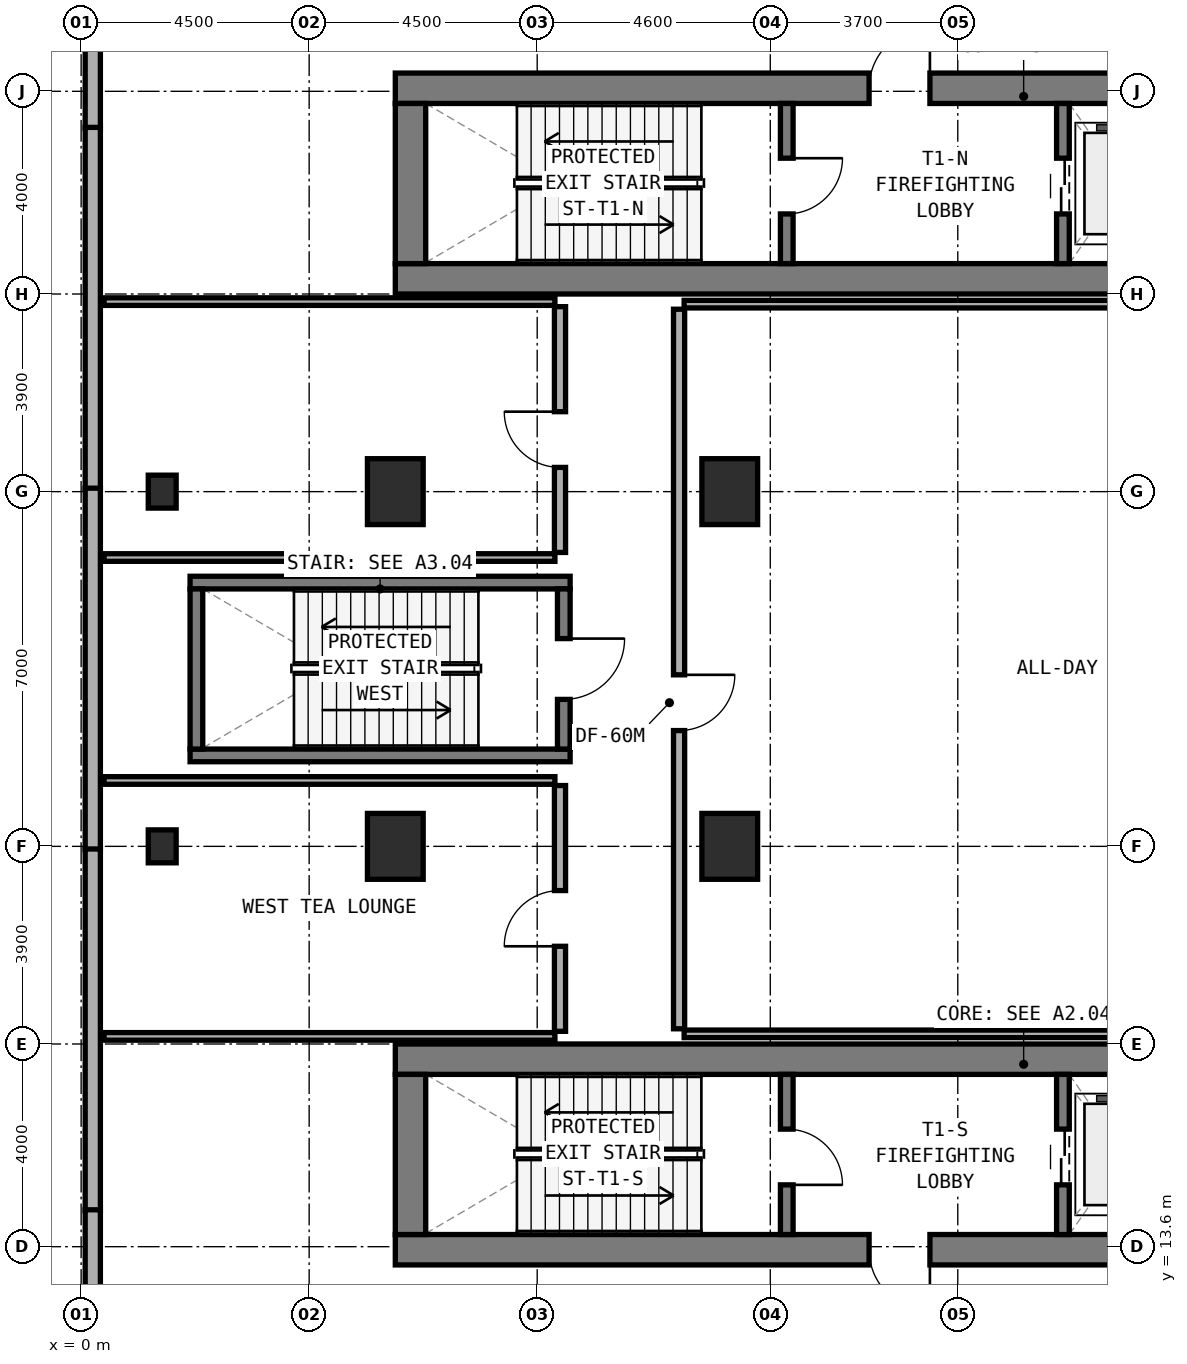
"""IFC4 building model, lengths in metres.
Left out: names, types, materials, properties, quantities, classifications, styles, units other than length and angle.
Written with IfcOpenShell. Run it as: python <this file> out.ifc"""

import sys

from ifc_helpers import new_model, si_unit, direction, frame, frame_2d, origin, origin_2d, place, context, subcontext, project, spatial, rectangle, extrude, element, fill, save


model = new_model("IFC4")
c1 = context("Model", 3, precision=1e-05, world=origin(), true_north=direction((0.0, 1.0)))
c2 = subcontext(c1, "Body", "Model", "MODEL_VIEW")
j1 = project(units=[si_unit("LENGTHUNIT", "METRE"), si_unit("PLANEANGLEUNIT", "RADIAN")], contexts=[c1])
p1 = place(None, origin())
s1 = spatial("IfcSite", under=j1, at=p1, CompositionType="ELEMENT")
p2 = place(p1, origin())
s2 = spatial("IfcBuilding", under=s1, at=p2, CompositionType="ELEMENT")
p3 = place(p2, frame((0.0, 0.0, 5.4)))
s3 = spatial("IfcBuildingStorey", under=s2, at=p3, CompositionType="ELEMENT", Elevation=5.4)
p4 = place(p3, frame((6.2, 32.7, 0.0), z_axis=(0.0, 0.0, 1.0), x_axis=(1.0, 0.0, 0.0)))
e1 = element("IfcWall", 1, at=p4, inside=s3, PredefinedType="SHEAR", context=c2, shape_type="SweptSolid", body=[
    extrude(rectangle(XDim=24.8, YDim=0.6, at=frame_2d((12.4, 0.0))), origin(), (0.0, 0.0, 1.0), 4.8),
])
p5 = place(p3, frame((6.2, 36.46, 0.0), z_axis=(0.0, 0.0, 1.0), x_axis=(1.0, 0.0, 0.0)))
e2 = element("IfcWall", 2, at=p5, inside=s3, PredefinedType="SHEAR", context=c2, shape_type="SweptSolid", body=[
    extrude(rectangle(XDim=24.8, YDim=0.6, at=frame_2d((12.4, 0.0))), origin(), (0.0, 0.0, 1.0), 4.8),
])
p6 = place(p5, frame((9.35, 0.0, 0.0)))
e3 = element("IfcOpeningElement", 3, at=p6, cuts=e2, PredefinedType="OPENING", context=c2, shape_type="SweptSolid", body=[
    extrude(rectangle(XDim=1.2, YDim=2.15, at=frame_2d((0.6, 1.075))), frame((0.0, 0.31, 0.0), z_axis=(0.0, -1.0, 0.0), x_axis=(1.0, 0.0, 0.0)), (0.0, 0.0, 1.0), 0.62),
])
p7 = place(p5, frame((17.14, 0.0, 0.0)))
e4 = element("IfcOpeningElement", 4, at=p7, cuts=e2, PredefinedType="OPENING", context=c2, shape_type="SweptSolid", body=[
    extrude(rectangle(XDim=0.85, YDim=2.1, at=frame_2d((0.425, 1.05))), frame((0.0, 0.31, 0.0), z_axis=(0.0, -1.0, 0.0), x_axis=(1.0, 0.0, 0.0)), (0.0, 0.0, 1.0), 0.62),
])
p8 = place(p5, frame((18.983, 0.0, 0.0)))
e5 = element("IfcOpeningElement", 5, at=p8, cuts=e2, PredefinedType="OPENING", context=c2, shape_type="SweptSolid", body=[
    extrude(rectangle(XDim=1.1, YDim=2.15, at=frame_2d((0.55, 1.075))), frame((0.0, 0.31, 0.0), z_axis=(0.0, -1.0, 0.0), x_axis=(1.0, 0.0, 0.0)), (0.0, 0.0, 1.0), 0.62),
])
p9 = place(p5, frame((20.85, 0.0, 0.0)))
e6 = element("IfcOpeningElement", 6, at=p9, cuts=e2, PredefinedType="OPENING", context=c2, shape_type="SweptSolid", body=[
    extrude(rectangle(XDim=1.1, YDim=2.15, at=frame_2d((0.55, 1.075))), frame((0.0, 0.31, 0.0), z_axis=(0.0, -1.0, 0.0), x_axis=(1.0, 0.0, 0.0)), (0.0, 0.0, 1.0), 0.62),
])
p10 = place(p5, frame((22.716, 0.0, 0.0)))
e7 = element("IfcOpeningElement", 7, at=p10, cuts=e2, PredefinedType="OPENING", context=c2, shape_type="SweptSolid", body=[
    extrude(rectangle(XDim=1.1, YDim=2.15, at=frame_2d((0.55, 1.075))), frame((0.0, 0.31, 0.0), z_axis=(0.0, -1.0, 0.0), x_axis=(1.0, 0.0, 0.0)), (0.0, 0.0, 1.0), 0.62),
])
p11 = place(p3, frame((6.5, 33.0, 0.0), z_axis=(0.0, 0.0, 1.0), x_axis=(0.0, 1.0, 0.0)))
e8 = element("IfcWall", 8, at=p11, inside=s3, PredefinedType="SHEAR", context=c2, shape_type="SweptSolid", body=[
    extrude(rectangle(XDim=3.16, YDim=0.6, at=frame_2d((1.58, 0.0))), origin(), (0.0, 0.0, 1.0), 4.8),
])
p12 = place(p3, frame((13.925, 33.0, 0.0), z_axis=(0.0, 0.0, 1.0), x_axis=(0.0, 1.0, 0.0)))
e9 = element("IfcWall", 9, at=p12, inside=s3, PredefinedType="STANDARD", context=c2, shape_type="SweptSolid", body=[
    extrude(rectangle(XDim=3.16, YDim=0.25, at=frame_2d((1.58, 0.0))), origin(), (0.0, 0.0, 1.0), 4.45),
])
p13 = place(p12, frame((0.98, 0.0, 0.0)))
e10 = element("IfcOpeningElement", 10, at=p13, cuts=e9, PredefinedType="OPENING", context=c2, shape_type="SweptSolid", body=[
    extrude(rectangle(XDim=1.1, YDim=2.15, at=frame_2d((0.55, 1.075))), frame((0.0, 0.135, 0.0), z_axis=(0.0, -1.0, 0.0), x_axis=(1.0, 0.0, 0.0)), (0.0, 0.0, 1.0), 0.27),
])
p14 = place(p3, frame((19.375, 33.0, 0.0), z_axis=(0.0, 0.0, 1.0), x_axis=(0.0, 1.0, 0.0)))
e11 = element("IfcWall", 11, at=p14, inside=s3, PredefinedType="STANDARD", context=c2, shape_type="SweptSolid", body=[
    extrude(rectangle(XDim=3.16, YDim=0.25, at=frame_2d((1.58, 0.0))), origin(), (0.0, 0.0, 1.0), 4.45),
])
p15 = place(p14, frame((0.98, 0.0, 0.0)))
e12 = element("IfcOpeningElement", 12, at=p15, cuts=e11, PredefinedType="OPENING", context=c2, shape_type="SweptSolid", body=[
    extrude(rectangle(XDim=1.1, YDim=2.15, at=frame_2d((0.55, 1.075))), frame((0.0, 0.135, 0.0), z_axis=(0.0, -1.0, 0.0), x_axis=(1.0, 0.0, 0.0)), (0.0, 0.0, 1.0), 0.27),
])
p16 = place(p3, frame((6.2, 13.54, 0.0), z_axis=(0.0, 0.0, 1.0), x_axis=(1.0, 0.0, 0.0)))
e13 = element("IfcWall", 13, at=p16, inside=s3, PredefinedType="SHEAR", context=c2, shape_type="SweptSolid", body=[
    extrude(rectangle(XDim=24.8, YDim=0.6, at=frame_2d((12.4, 0.0))), origin(), (0.0, 0.0, 1.0), 4.8),
])
p17 = place(p16, frame((9.35, 0.0, 0.0)))
e14 = element("IfcOpeningElement", 14, at=p17, cuts=e13, PredefinedType="OPENING", context=c2, shape_type="SweptSolid", body=[
    extrude(rectangle(XDim=1.2, YDim=2.15, at=frame_2d((0.6, 1.075))), frame((0.0, 0.31, 0.0), z_axis=(0.0, -1.0, 0.0), x_axis=(1.0, 0.0, 0.0)), (0.0, 0.0, 1.0), 0.62),
])
p18 = place(p16, frame((17.14, 0.0, 0.0)))
e15 = element("IfcOpeningElement", 15, at=p18, cuts=e13, PredefinedType="OPENING", context=c2, shape_type="SweptSolid", body=[
    extrude(rectangle(XDim=0.85, YDim=2.1, at=frame_2d((0.425, 1.05))), frame((0.0, 0.31, 0.0), z_axis=(0.0, -1.0, 0.0), x_axis=(1.0, 0.0, 0.0)), (0.0, 0.0, 1.0), 0.62),
])
p19 = place(p16, frame((18.983, 0.0, 0.0)))
e16 = element("IfcOpeningElement", 16, at=p19, cuts=e13, PredefinedType="OPENING", context=c2, shape_type="SweptSolid", body=[
    extrude(rectangle(XDim=1.1, YDim=2.15, at=frame_2d((0.55, 1.075))), frame((0.0, 0.31, 0.0), z_axis=(0.0, -1.0, 0.0), x_axis=(1.0, 0.0, 0.0)), (0.0, 0.0, 1.0), 0.62),
])
p20 = place(p16, frame((20.85, 0.0, 0.0)))
e17 = element("IfcOpeningElement", 17, at=p20, cuts=e13, PredefinedType="OPENING", context=c2, shape_type="SweptSolid", body=[
    extrude(rectangle(XDim=1.1, YDim=2.15, at=frame_2d((0.55, 1.075))), frame((0.0, 0.31, 0.0), z_axis=(0.0, -1.0, 0.0), x_axis=(1.0, 0.0, 0.0)), (0.0, 0.0, 1.0), 0.62),
])
p21 = place(p16, frame((22.716, 0.0, 0.0)))
e18 = element("IfcOpeningElement", 18, at=p21, cuts=e13, PredefinedType="OPENING", context=c2, shape_type="SweptSolid", body=[
    extrude(rectangle(XDim=1.1, YDim=2.15, at=frame_2d((0.55, 1.075))), frame((0.0, 0.31, 0.0), z_axis=(0.0, -1.0, 0.0), x_axis=(1.0, 0.0, 0.0)), (0.0, 0.0, 1.0), 0.62),
])
p22 = place(p3, frame((6.2, 17.3, 0.0), z_axis=(0.0, 0.0, 1.0), x_axis=(1.0, 0.0, 0.0)))
e19 = element("IfcWall", 19, at=p22, inside=s3, PredefinedType="SHEAR", context=c2, shape_type="SweptSolid", body=[
    extrude(rectangle(XDim=24.8, YDim=0.6, at=frame_2d((12.4, 0.0))), origin(), (0.0, 0.0, 1.0), 4.8),
])
p23 = place(p3, frame((6.5, 13.84, 0.0), z_axis=(0.0, 0.0, 1.0), x_axis=(0.0, 1.0, 0.0)))
e20 = element("IfcWall", 20, at=p23, inside=s3, PredefinedType="SHEAR", context=c2, shape_type="SweptSolid", body=[
    extrude(rectangle(XDim=3.16, YDim=0.6, at=frame_2d((1.58, 0.0))), origin(), (0.0, 0.0, 1.0), 4.8),
])
p24 = place(p3, frame((13.925, 13.84, 0.0), z_axis=(0.0, 0.0, 1.0), x_axis=(0.0, 1.0, 0.0)))
e21 = element("IfcWall", 21, at=p24, inside=s3, PredefinedType="STANDARD", context=c2, shape_type="SweptSolid", body=[
    extrude(rectangle(XDim=3.16, YDim=0.25, at=frame_2d((1.58, 0.0))), origin(), (0.0, 0.0, 1.0), 4.45),
])
p25 = place(p24, frame((0.98, 0.0, 0.0)))
e22 = element("IfcOpeningElement", 22, at=p25, cuts=e21, PredefinedType="OPENING", context=c2, shape_type="SweptSolid", body=[
    extrude(rectangle(XDim=1.1, YDim=2.15, at=frame_2d((0.55, 1.075))), frame((0.0, 0.135, 0.0), z_axis=(0.0, -1.0, 0.0), x_axis=(1.0, 0.0, 0.0)), (0.0, 0.0, 1.0), 0.27),
])
p26 = place(p3, frame((19.375, 13.84, 0.0), z_axis=(0.0, 0.0, 1.0), x_axis=(0.0, 1.0, 0.0)))
e23 = element("IfcWall", 23, at=p26, inside=s3, PredefinedType="STANDARD", context=c2, shape_type="SweptSolid", body=[
    extrude(rectangle(XDim=3.16, YDim=0.25, at=frame_2d((1.58, 0.0))), origin(), (0.0, 0.0, 1.0), 4.45),
])
p27 = place(p26, frame((0.98, 0.0, 0.0)))
e24 = element("IfcOpeningElement", 24, at=p27, cuts=e23, PredefinedType="OPENING", context=c2, shape_type="SweptSolid", body=[
    extrude(rectangle(XDim=1.1, YDim=2.15, at=frame_2d((0.55, 1.075))), frame((0.0, 0.135, 0.0), z_axis=(0.0, -1.0, 0.0), x_axis=(1.0, 0.0, 0.0)), (0.0, 0.0, 1.0), 0.27),
])
for number, where, z_axis, x_axis in (
    (25, (2.15, 23.295, 0.0), (0.0, 0.0, 1.0), (1.0, 0.0, 0.0)),
    (26, (2.15, 26.705, 0.0), (0.0, 0.0, 1.0), (1.0, 0.0, 0.0)),
):
    element("IfcWall", number, at=place(p3, frame(where, z_axis=z_axis, x_axis=x_axis)), inside=s3, PredefinedType="STANDARD", context=c2, shape_type="SweptSolid", body=[
        extrude(rectangle(XDim=7.5, YDim=0.25, at=frame_2d((3.75, 0.0))), origin(), (0.0, 0.0, 1.0), 4.8),
    ])
p28 = place(p3, frame((2.275, 23.42, 0.0), z_axis=(0.0, 0.0, 1.0), x_axis=(0.0, 1.0, 0.0)))
e27 = element("IfcWall", 27, at=p28, inside=s3, PredefinedType="STANDARD", context=c2, shape_type="SweptSolid", body=[
    extrude(rectangle(XDim=3.16, YDim=0.25, at=frame_2d((1.58, 0.0))), origin(), (0.0, 0.0, 1.0), 4.8),
])
p29 = place(p3, frame((9.525, 23.42, 0.0), z_axis=(0.0, 0.0, 1.0), x_axis=(0.0, 1.0, 0.0)))
e28 = element("IfcWall", 28, at=p29, inside=s3, PredefinedType="STANDARD", context=c2, shape_type="SweptSolid", body=[
    extrude(rectangle(XDim=3.16, YDim=0.25, at=frame_2d((1.58, 0.0))), origin(), (0.0, 0.0, 1.0), 4.8),
])
p30 = place(p29, frame((0.98, 0.0, 0.0)))
e29 = element("IfcOpeningElement", 29, at=p30, cuts=e28, PredefinedType="OPENING", context=c2, shape_type="SweptSolid", body=[
    extrude(rectangle(XDim=1.2, YDim=2.15, at=frame_2d((0.6, 1.075))), frame((0.0, 0.135, 0.0), z_axis=(0.0, -1.0, 0.0), x_axis=(1.0, 0.0, 0.0)), (0.0, 0.0, 1.0), 0.27),
])
for number, where, z_axis, x_axis in (
    (30, (6.2, 21.5, 0.0), (0.0, 0.0, 1.0), (1.0, 0.0, 0.0)),
    (31, (6.2, 28.5, 0.0), (0.0, 0.0, 1.0), (1.0, 0.0, 0.0)),
    (32, (12.8, 21.5, 0.0), (0.0, 0.0, 1.0), (1.0, 0.0, 0.0)),
    (33, (12.8, 28.5, 0.0), (0.0, 0.0, 1.0), (1.0, 0.0, 0.0)),
):
    element("IfcColumn", number, at=place(p3, frame(where, z_axis=z_axis, x_axis=x_axis)), inside=s3, PredefinedType="COLUMN", context=c2, shape_type="SweptSolid", body=[
        extrude(rectangle(XDim=1.1, YDim=1.3, at=origin_2d()), origin(), (0.0, 0.0, 1.0), 4.8),
    ])
for number, where, z_axis, x_axis in (
    (34, (1.6, 21.5, 0.0), (0.0, 0.0, 1.0), (1.0, 0.0, 0.0)),
    (35, (1.6, 28.5, 0.0), (0.0, 0.0, 1.0), (1.0, 0.0, 0.0)),
):
    element("IfcColumn", number, at=place(p3, frame(where, z_axis=z_axis, x_axis=x_axis)), inside=s3, PredefinedType="PILASTER", context=c2, shape_type="SweptSolid", body=[
        extrude(rectangle(XDim=0.55, YDim=0.65, at=origin_2d()), origin(), (0.0, 0.0, 1.0), 4.8),
    ])
for number, where, z_axis, x_axis in (
    (36, (0.23, 42.808, 0.0), (0.0, 0.0, 1.0), (0.0, -1.0, 0.0)),
    (37, (0.23, 35.688, 0.0), (0.0, 0.0, 1.0), (0.0, -1.0, 0.0)),
):
    element("IfcWall", number, at=place(p3, frame(where, z_axis=z_axis, x_axis=x_axis)), inside=s3, PredefinedType="STANDARD", context=c2, shape_type="SweptSolid", body=[
        extrude(rectangle(XDim=7.136, YDim=0.3, at=frame_2d((3.568, 0.0))), origin(), (0.0, 0.0, 1.0), 4.45),
    ])
p31 = place(p3, frame((0.23, 28.568, 0.0), z_axis=(0.0, 0.0, 1.0), x_axis=(0.0, -1.0, 0.0)))
e38 = element("IfcWall", 38, at=p31, inside=s3, PredefinedType="STANDARD", context=c2, shape_type="SweptSolid", body=[
    extrude(rectangle(XDim=7.136, YDim=0.3, at=frame_2d((3.568, 0.0))), origin(), (0.0, 0.0, 1.0), 4.45),
])
for number, where, z_axis, x_axis in (
    (39, (0.23, 21.448, 0.0), (0.0, 0.0, 1.0), (0.0, -1.0, 0.0)),
    (40, (0.23, 14.328, 0.0), (0.0, 0.0, 1.0), (0.0, -1.0, 0.0)),
):
    element("IfcWall", number, at=place(p3, frame(where, z_axis=z_axis, x_axis=x_axis)), inside=s3, PredefinedType="STANDARD", context=c2, shape_type="SweptSolid", body=[
        extrude(rectangle(XDim=7.136, YDim=0.3, at=frame_2d((3.568, 0.0))), origin(), (0.0, 0.0, 1.0), 4.45),
    ])
for number, where, z_axis, x_axis in (
    (41, (11.9, 17.8, 0.0), (0.0, 0.0, 1.0), (1.0, 0.0, 0.0)),
    (42, (11.9, 32.2, 0.0), (0.0, 0.0, 1.0), (1.0, 0.0, 0.0)),
):
    element("IfcWall", number, at=place(p3, frame(where, z_axis=z_axis, x_axis=x_axis)), inside=s3, PredefinedType="PARTITIONING", context=c2, shape_type="SweptSolid", body=[
        extrude(rectangle(XDim=18.85, YDim=0.15, at=frame_2d((9.425, 0.0))), origin(), (0.0, 0.0, 1.0), 3.525),
    ])
p32 = place(p3, frame((11.8, 17.9, 0.0), z_axis=(0.0, 0.0, 1.0), x_axis=(0.0, 1.0, 0.0)))
e43 = element("IfcWall", 43, at=p32, inside=s3, PredefinedType="SOLIDWALL", context=c2, shape_type="SweptSolid", body=[
    extrude(rectangle(XDim=14.2, YDim=0.22, at=frame_2d((7.1, 0.0))), origin(), (0.0, 0.0, 1.0), 3.525),
])
p33 = place(p32, frame((5.885, 0.0, 0.0)))
e44 = element("IfcOpeningElement", 44, at=p33, cuts=e43, PredefinedType="OPENING", context=c2, shape_type="SweptSolid", body=[
    extrude(rectangle(XDim=1.1, YDim=2.1, at=frame_2d((0.55, 1.05))), frame((0.0, 0.12, 0.0), z_axis=(0.0, -1.0, 0.0), x_axis=(1.0, 0.0, 0.0)), (0.0, 0.0, 1.0), 0.24),
])
p34 = place(p3, frame((0.45, 17.75, 0.0), z_axis=(0.0, 0.0, 1.0), x_axis=(1.0, 0.0, 0.0)))
e45 = element("IfcWall", 45, at=p34, inside=s3, PredefinedType="PARTITIONING", context=c2, shape_type="SweptSolid", body=[
    extrude(rectangle(XDim=8.9, YDim=0.15, at=frame_2d((4.45, 0.0))), origin(), (0.0, 0.0, 1.0), 3.725),
])
p35 = place(p3, frame((0.45, 22.8, 0.0), z_axis=(0.0, 0.0, 1.0), x_axis=(1.0, 0.0, 0.0)))
e46 = element("IfcWall", 46, at=p35, inside=s3, PredefinedType="PARTITIONING", context=c2, shape_type="SweptSolid", body=[
    extrude(rectangle(XDim=8.9, YDim=0.15, at=frame_2d((4.45, 0.0))), origin(), (0.0, 0.0, 1.0), 3.925),
])
p36 = place(p3, frame((9.45, 17.85, 0.0), z_axis=(0.0, 0.0, 1.0), x_axis=(0.0, 1.0, 0.0)))
e47 = element("IfcWall", 47, at=p36, inside=s3, PredefinedType="SOLIDWALL", context=c2, shape_type="SweptSolid", body=[
    extrude(rectangle(XDim=4.85, YDim=0.22, at=frame_2d((2.425, 0.0))), origin(), (0.0, 0.0, 1.0), 3.525),
])
p37 = place(p36, frame((1.678, 0.0, 0.0)))
e48 = element("IfcOpeningElement", 48, at=p37, cuts=e47, PredefinedType="OPENING", context=c2, shape_type="SweptSolid", body=[
    extrude(rectangle(XDim=1.1, YDim=2.1, at=frame_2d((0.55, 1.05))), frame((0.0, 0.12, 0.0), z_axis=(0.0, -1.0, 0.0), x_axis=(1.0, 0.0, 0.0)), (0.0, 0.0, 1.0), 0.24),
])
p38 = place(p3, frame((0.45, 27.2, 0.0), z_axis=(0.0, 0.0, 1.0), x_axis=(1.0, 0.0, 0.0)))
e49 = element("IfcWall", 49, at=p38, inside=s3, PredefinedType="PARTITIONING", context=c2, shape_type="SweptSolid", body=[
    extrude(rectangle(XDim=8.9, YDim=0.15, at=frame_2d((4.45, 0.0))), origin(), (0.0, 0.0, 1.0), 3.925),
])
p39 = place(p3, frame((0.45, 32.25, 0.0), z_axis=(0.0, 0.0, 1.0), x_axis=(1.0, 0.0, 0.0)))
e50 = element("IfcWall", 50, at=p39, inside=s3, PredefinedType="PARTITIONING", context=c2, shape_type="SweptSolid", body=[
    extrude(rectangle(XDim=8.9, YDim=0.15, at=frame_2d((4.45, 0.0))), origin(), (0.0, 0.0, 1.0), 3.725),
])
p40 = place(p3, frame((9.45, 27.3, 0.0), z_axis=(0.0, 0.0, 1.0), x_axis=(0.0, 1.0, 0.0)))
e51 = element("IfcWall", 51, at=p40, inside=s3, PredefinedType="SOLIDWALL", context=c2, shape_type="SweptSolid", body=[
    extrude(rectangle(XDim=4.85, YDim=0.22, at=frame_2d((2.425, 0.0))), origin(), (0.0, 0.0, 1.0), 3.525),
])
p41 = place(p40, frame((1.678, 0.0, 0.0)))
e52 = element("IfcOpeningElement", 52, at=p41, cuts=e51, PredefinedType="OPENING", context=c2, shape_type="SweptSolid", body=[
    extrude(rectangle(XDim=1.1, YDim=2.1, at=frame_2d((0.55, 1.05))), frame((0.0, 0.12, 0.0), z_axis=(0.0, -1.0, 0.0), x_axis=(1.0, 0.0, 0.0)), (0.0, 0.0, 1.0), 0.24),
])
p42 = place(p13, frame((1.1, 0.0, 0.0), z_axis=(0.0, 0.0, 1.0), x_axis=(-1.0, 0.0, 0.0)))
e53 = element("IfcDoor", 53, at=p42, inside=s3, OperationType="SINGLE_SWING_LEFT", PredefinedType="DOOR", context=c2, shape_type="SweptSolid", body=[
    extrude(rectangle(XDim=1.1, YDim=2.15, at=frame_2d((0.55, 1.075))), frame((0.0, 0.025, 0.0), z_axis=(0.0, -1.0, 0.0), x_axis=(1.0, 0.0, 0.0)), (0.0, 0.0, 1.0), 0.05),
])
fill(e10, e53)
p43 = place(p6, origin())
e54 = element("IfcDoor", 54, at=p43, inside=s3, OperationType="SINGLE_SWING_RIGHT", PredefinedType="DOOR", context=c2, shape_type="SweptSolid", body=[
    extrude(rectangle(XDim=1.2, YDim=2.15, at=frame_2d((0.6, 1.075))), frame((0.0, 0.025, 0.0), z_axis=(0.0, -1.0, 0.0), x_axis=(1.0, 0.0, 0.0)), (0.0, 0.0, 1.0), 0.05),
])
fill(e3, e54)
p44 = place(p15, origin())
e55 = element("IfcDoor", 55, at=p44, inside=s3, OperationType="DOUBLE_DOOR_SLIDING", PredefinedType="DOOR", context=c2, shape_type="SweptSolid", body=[
    extrude(rectangle(XDim=1.1, YDim=2.15, at=frame_2d((0.55, 1.075))), frame((0.0, 0.025, 0.0), z_axis=(0.0, -1.0, 0.0), x_axis=(1.0, 0.0, 0.0)), (0.0, 0.0, 1.0), 0.05),
])
fill(e12, e55)
p45 = place(p25, frame((1.1, 0.0, 0.0), z_axis=(0.0, 0.0, 1.0), x_axis=(-1.0, 0.0, 0.0)))
e56 = element("IfcDoor", 56, at=p45, inside=s3, OperationType="SINGLE_SWING_RIGHT", PredefinedType="DOOR", context=c2, shape_type="SweptSolid", body=[
    extrude(rectangle(XDim=1.1, YDim=2.15, at=frame_2d((0.55, 1.075))), frame((0.0, 0.025, 0.0), z_axis=(0.0, -1.0, 0.0), x_axis=(1.0, 0.0, 0.0)), (0.0, 0.0, 1.0), 0.05),
])
fill(e22, e56)
p46 = place(p17, frame((1.2, 0.0, 0.0), z_axis=(0.0, 0.0, 1.0), x_axis=(-1.0, 0.0, 0.0)))
e57 = element("IfcDoor", 57, at=p46, inside=s3, OperationType="SINGLE_SWING_LEFT", PredefinedType="DOOR", context=c2, shape_type="SweptSolid", body=[
    extrude(rectangle(XDim=1.2, YDim=2.15, at=frame_2d((0.6, 1.075))), frame((0.0, 0.025, 0.0), z_axis=(0.0, -1.0, 0.0), x_axis=(1.0, 0.0, 0.0)), (0.0, 0.0, 1.0), 0.05),
])
fill(e14, e57)
p47 = place(p27, origin())
e58 = element("IfcDoor", 58, at=p47, inside=s3, OperationType="DOUBLE_DOOR_SLIDING", PredefinedType="DOOR", context=c2, shape_type="SweptSolid", body=[
    extrude(rectangle(XDim=1.1, YDim=2.15, at=frame_2d((0.55, 1.075))), frame((0.0, 0.025, 0.0), z_axis=(0.0, -1.0, 0.0), x_axis=(1.0, 0.0, 0.0)), (0.0, 0.0, 1.0), 0.05),
])
fill(e24, e58)
p48 = place(p30, frame((1.2, 0.0, 0.0), z_axis=(0.0, 0.0, 1.0), x_axis=(-1.0, 0.0, 0.0)))
e59 = element("IfcDoor", 59, at=p48, inside=s3, OperationType="SINGLE_SWING_LEFT", PredefinedType="DOOR", context=c2, shape_type="SweptSolid", body=[
    extrude(rectangle(XDim=1.2, YDim=2.15, at=frame_2d((0.6, 1.075))), frame((0.0, 0.025, 0.0), z_axis=(0.0, -1.0, 0.0), x_axis=(1.0, 0.0, 0.0)), (0.0, 0.0, 1.0), 0.05),
])
fill(e29, e59)
p49 = place(p33, frame((1.1, 0.0, 0.0), z_axis=(0.0, 0.0, 1.0), x_axis=(-1.0, 0.0, 0.0)))
e60 = element("IfcDoor", 60, at=p49, inside=s3, OperationType="SINGLE_SWING_LEFT", PredefinedType="DOOR", context=c2, shape_type="SweptSolid", body=[
    extrude(rectangle(XDim=1.1, YDim=2.1, at=frame_2d((0.55, 1.05))), frame((0.0, 0.025, 0.0), z_axis=(0.0, -1.0, 0.0), x_axis=(1.0, 0.0, 0.0)), (0.0, 0.0, 1.0), 0.05),
])
fill(e44, e60)
p50 = place(p37, origin())
e61 = element("IfcDoor", 61, at=p50, inside=s3, OperationType="SINGLE_SWING_LEFT", PredefinedType="DOOR", context=c2, shape_type="SweptSolid", body=[
    extrude(rectangle(XDim=1.1, YDim=2.1, at=frame_2d((0.55, 1.05))), frame((0.0, 0.025, 0.0), z_axis=(0.0, -1.0, 0.0), x_axis=(1.0, 0.0, 0.0)), (0.0, 0.0, 1.0), 0.05),
])
fill(e48, e61)
p51 = place(p41, origin())
e62 = element("IfcDoor", 62, at=p51, inside=s3, OperationType="SINGLE_SWING_RIGHT", PredefinedType="DOOR", context=c2, shape_type="SweptSolid", body=[
    extrude(rectangle(XDim=1.1, YDim=2.1, at=frame_2d((0.55, 1.05))), frame((0.0, 0.025, 0.0), z_axis=(0.0, -1.0, 0.0), x_axis=(1.0, 0.0, 0.0)), (0.0, 0.0, 1.0), 0.05),
])
fill(e52, e62)
save(model, sys.argv[1])
